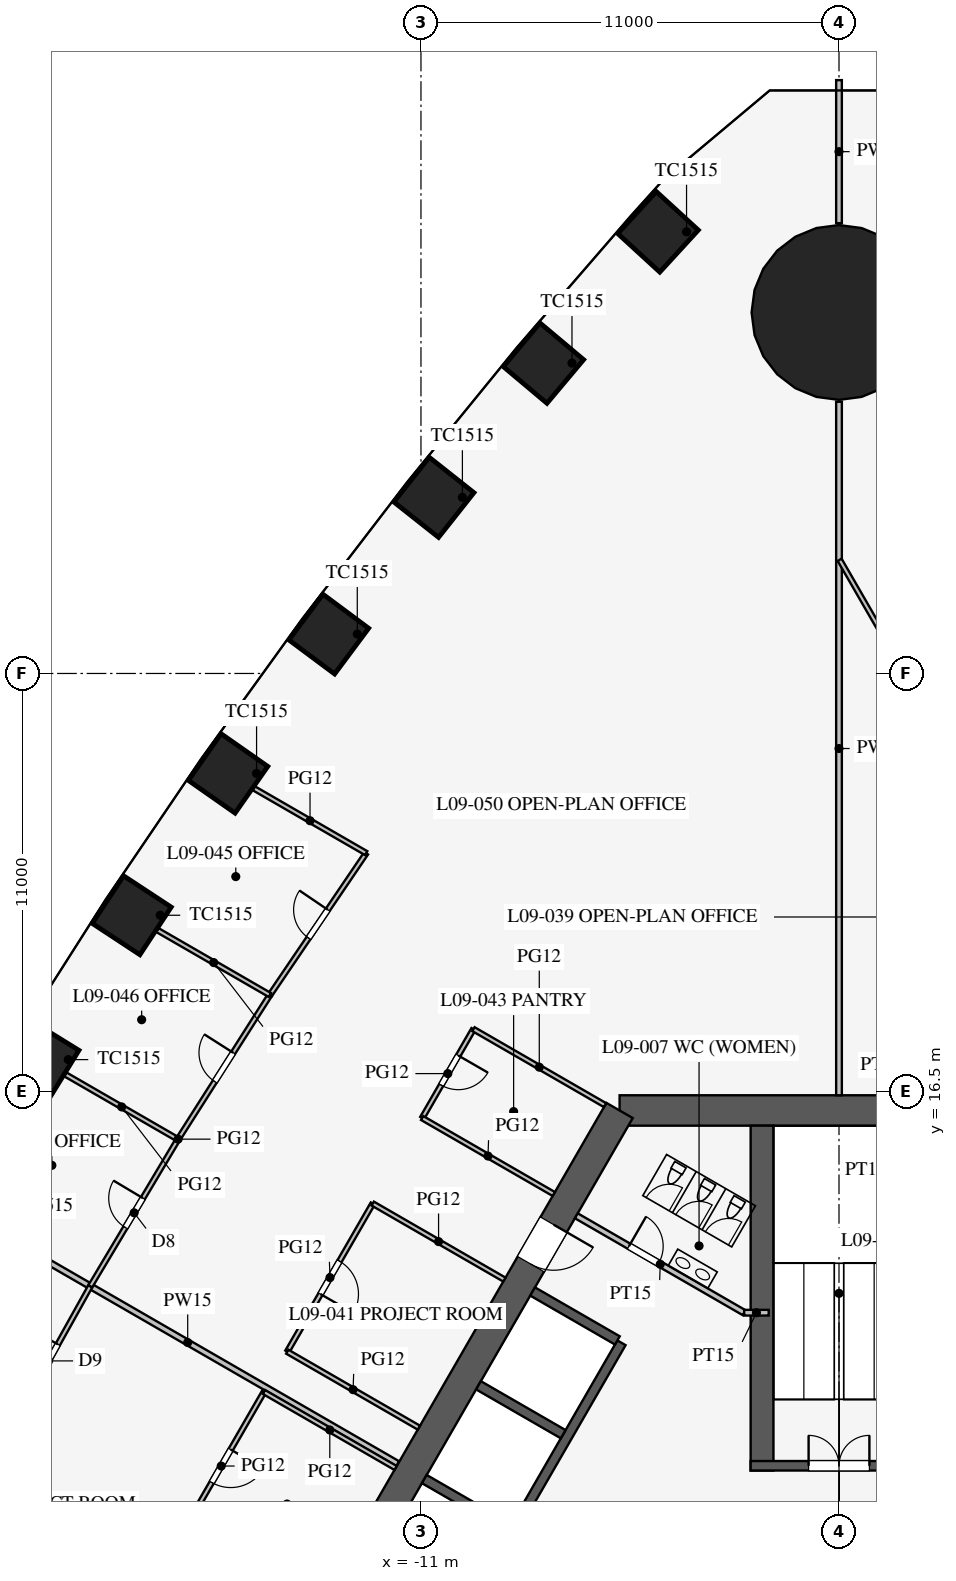
"""IFC4 building model, lengths in metres.
Left out: names, types, materials, properties, quantities, classifications, styles, units other than length and angle.
Written with IfcOpenShell. Run it as: python <this file> out.ifc"""

import sys

from ifc_helpers import new_model, si_unit, direction, frame, frame_2d, origin, origin_2d, place, context, subcontext, project, spatial, rectangle, circle, extrude, element, fill, save


model = new_model("IFC4")
c1 = context("Model", 3, precision=1e-05, world=origin(), true_north=direction((0.0, 1.0)))
c2 = subcontext(c1, "Body", "Model", "MODEL_VIEW")
j1 = project(units=[si_unit("LENGTHUNIT", "METRE"), si_unit("PLANEANGLEUNIT", "RADIAN")], contexts=[c1])
p1 = place(None, origin())
s1 = spatial("IfcSite", under=j1, at=p1, CompositionType="ELEMENT")
p2 = place(p1, origin())
s2 = spatial("IfcBuilding", under=s1, at=p2, CompositionType="ELEMENT")
p3 = place(p2, frame((0.0, 0.0, 41.7)))
s3 = spatial("IfcBuildingStorey", under=s2, at=p3, CompositionType="ELEMENT", Elevation=41.7)
for number, where, z_axis, x_axis in (
    (1, (-4.762, 39.122, 0.0), (0.0, 0.0, 1.0), (-0.676, -0.737, 0.0)),
    (2, (-7.776, 35.667, 0.0), (0.0, 0.0, 1.0), (-0.643, -0.766, 0.0)),
    (3, (-10.66, 32.135, 0.0), (0.0, 0.0, 1.0), (-0.62, -0.784, 0.0)),
    (4, (-13.426, 28.536, 0.0), (0.0, 0.0, 1.0), (-0.597, -0.802, 0.0)),
    (5, (-16.076, 24.87, 0.0), (0.0, 0.0, 1.0), (-0.574, -0.819, 0.0)),
    (6, (-18.611, 21.137, 0.0), (0.0, 0.0, 1.0), (-0.549, -0.836, 0.0)),
    (7, (-21.031, 17.339, 0.0), (0.0, 0.0, 1.0), (-0.525, -0.851, 0.0)),
):
    element("IfcColumn", number, at=place(p3, frame(where, z_axis=z_axis, x_axis=x_axis)), inside=s3, PredefinedType="COLUMN", context=c2, shape_type="SweptSolid", body=[
        extrude(rectangle(XDim=1.5, YDim=1.5, at=origin_2d()), origin(), (0.0, 0.0, 1.0), 4.2),
    ])
p4 = place(p3, frame((0.0, 37.0, 0.0), z_axis=(0.0, 0.0, 1.0), x_axis=(1.0, 0.0, 0.0)))
e8 = element("IfcColumn", 8, at=p4, inside=s3, PredefinedType="COLUMN", context=c2, shape_type="SweptSolid", body=[
    extrude(circle(Radius=2.3, at=origin_2d()), origin(), (0.0, 0.0, 1.0), 4.2),
])
p5 = place(p3, frame((5.773, 16.0, 0.0), z_axis=(0.0, 0.0, 1.0), x_axis=(-1.0, 0.0, 0.0)))
e9 = element("IfcWall", 9, at=p5, inside=s3, PredefinedType="SHEAR", context=c2, shape_type="SweptSolid", body=[
    extrude(rectangle(XDim=11.547, YDim=0.8, at=frame_2d((5.773, 0.0))), origin(), (0.0, 0.0, 1.0), 4.2),
])
p6 = place(p3, frame((-5.773, 16.0, 0.0), z_axis=(0.0, 0.0, 1.0), x_axis=(-0.500002442456, -0.866023993627, 0.0)))
e10 = element("IfcWall", 10, at=p6, inside=s3, PredefinedType="SHEAR", context=c2, shape_type="SweptSolid", body=[
    extrude(rectangle(XDim=21.939, YDim=0.8, at=frame_2d((10.97, 0.0))), origin(), (0.0, 0.0, 1.0), 4.2),
])
p7 = place(p6, frame((17.27, 0.0, 0.0)))
e11 = element("IfcOpeningElement", 11, at=p7, cuts=e10, PredefinedType="OPENING", context=c2, shape_type="SweptSolid", body=[
    extrude(rectangle(XDim=1.2, YDim=2.1, at=frame_2d((0.6, 1.05))), frame((0.0, 0.41, 0.0), z_axis=(0.0, -1.0, 0.0), x_axis=(1.0, 0.0, 0.0)), (0.0, 0.0, 1.0), 0.82),
])
p8 = place(p6, frame((3.47, 0.0, 0.0)))
e12 = element("IfcOpeningElement", 12, at=p8, cuts=e10, PredefinedType="OPENING", context=c2, shape_type="SweptSolid", body=[
    extrude(rectangle(XDim=1.2, YDim=2.1, at=frame_2d((0.6, 1.05))), frame((0.0, 0.41, 0.0), z_axis=(0.0, -1.0, 0.0), x_axis=(1.0, 0.0, 0.0)), (0.0, 0.0, 1.0), 0.82),
])
p9 = place(p3, frame((-5.724, 9.886, 0.0), z_axis=(0.0, 0.0, 1.0), x_axis=(-0.500001763848, -0.866024385424, 0.0)))
e13 = element("IfcWall", 13, at=p9, inside=s3, PredefinedType="SHEAR", context=c2, shape_type="SweptSolid", body=[
    extrude(rectangle(XDim=11.4, YDim=0.25, at=frame_2d((5.7, 0.0))), origin(), (0.0, 0.0, 1.0), 4.2),
])
p10 = place(p9, frame((6.525, 0.0, 0.0)))
e14 = element("IfcOpeningElement", 14, at=p10, cuts=e13, PredefinedType="OPENING", context=c2, shape_type="SweptSolid", body=[
    extrude(rectangle(XDim=1.2, YDim=2.2, at=frame_2d((0.6, 1.1))), frame((0.0, 0.135, 0.0), z_axis=(0.0, -1.0, 0.0), x_axis=(1.0, 0.0, 0.0)), (0.0, 0.0, 1.0), 0.27),
])
p11 = place(p9, frame((9.375, 0.0, 0.0)))
e15 = element("IfcOpeningElement", 15, at=p11, cuts=e13, PredefinedType="OPENING", context=c2, shape_type="SweptSolid", body=[
    extrude(rectangle(XDim=1.2, YDim=2.2, at=frame_2d((0.6, 1.1))), frame((0.0, 0.135, 0.0), z_axis=(0.0, -1.0, 0.0), x_axis=(1.0, 0.0, 0.0)), (0.0, 0.0, 1.0), 0.27),
])
p12 = place(p3, frame((-5.832, 9.949, 0.0), z_axis=(0.0, 0.0, 1.0), x_axis=(-0.866029291668, 0.499993265928, 0.0)))
e16 = element("IfcWall", 16, at=p12, inside=s3, PredefinedType="SHEAR", context=c2, shape_type="SweptSolid", body=[
    extrude(rectangle(XDim=2.575, YDim=0.25, at=frame_2d((1.288, 0.0))), origin(), (0.0, 0.0, 1.0), 4.2),
])
for number, where, z_axis, x_axis in (
    (17, (-7.257, 7.481, 0.0), (0.0, 0.0, 1.0), (-0.866, 0.5, 0.0)),
    (18, (-8.682, 5.012, 0.0), (0.0, 0.0, 1.0), (-0.866, 0.5, 0.0)),
):
    element("IfcWall", number, at=place(p3, frame(where, z_axis=z_axis, x_axis=x_axis)), inside=s3, PredefinedType="SHEAR", context=c2, shape_type="SweptSolid", body=[
        extrude(rectangle(XDim=2.575, YDim=0.25, at=frame_2d((1.288, 0.0))), origin(), (0.0, 0.0, 1.0), 4.2),
    ])
p13 = place(p3, frame((-2.025, 6.525, 0.0), z_axis=(0.0, 0.0, 1.0), x_axis=(0.0, 1.0, 0.0)))
e19 = element("IfcWall", 19, at=p13, inside=s3, PredefinedType="SHEAR", context=c2, shape_type="SweptSolid", body=[
    extrude(rectangle(XDim=9.075, YDim=0.6, at=frame_2d((4.538, 0.0))), origin(), (0.0, 0.0, 1.0), 4.2),
])
p14 = place(p3, frame((2.325, 6.65, 0.0), z_axis=(0.0, 0.0, 1.0), x_axis=(-1.0, 0.0, 0.0)))
e20 = element("IfcWall", 20, at=p14, inside=s3, PredefinedType="SHEAR", context=c2, shape_type="SweptSolid", body=[
    extrude(rectangle(XDim=4.65, YDim=0.25, at=frame_2d((2.325, 0.0))), origin(), (0.0, 0.0, 1.0), 4.2),
])
p15 = place(p14, frame((1.525, 0.0, 0.0)))
e21 = element("IfcOpeningElement", 21, at=p15, cuts=e20, PredefinedType="OPENING", context=c2, shape_type="SweptSolid", body=[
    extrude(rectangle(XDim=1.6, YDim=2.1, at=frame_2d((0.8, 1.05))), frame((0.0, 0.135, 0.0), z_axis=(0.0, -1.0, 0.0), x_axis=(1.0, 0.0, 0.0)), (0.0, 0.0, 1.0), 0.27),
])
p16 = place(p3, frame((-2.495, 10.678, 0.0), z_axis=(0.0, 0.0, 1.0), x_axis=(-0.86602216432, 0.500005610874, 0.0)))
e22 = element("IfcWall", 22, at=p16, inside=s3, PredefinedType="PARTITIONING", context=c2, shape_type="SweptSolid", body=[
    extrude(rectangle(XDim=5.1, YDim=0.15, at=frame_2d((2.55, 0.0))), origin(), (0.0, 0.0, 1.0), 4.0),
])
p17 = place(p16, frame((2.6, 0.0, 0.0)))
e23 = element("IfcOpeningElement", 23, at=p17, cuts=e22, PredefinedType="OPENING", context=c2, shape_type="SweptSolid", body=[
    extrude(rectangle(XDim=0.9, YDim=2.1, at=frame_2d((0.45, 1.05))), frame((0.0, 0.085, 0.0), z_axis=(0.0, -1.0, 0.0), x_axis=(1.0, 0.0, 0.0)), (0.0, 0.0, 1.0), 0.17),
])
p18 = place(p3, frame((-2.495, 10.678, 0.0), z_axis=(0.0, 0.0, 1.0), x_axis=(1.0, 0.0, 0.0)))
e24 = element("IfcWall", 24, at=p18, inside=s3, PredefinedType="PARTITIONING", context=c2, shape_type="SweptSolid", body=[
    extrude(rectangle(XDim=0.645, YDim=0.15, at=frame_2d((0.323, 0.0))), origin(), (0.0, 0.0, 1.0), 4.0),
])
p19 = place(p3, frame((0.0, 16.4, 0.0), z_axis=(0.0, 0.0, 1.0), x_axis=(0.0, 1.0, 0.0)))
e25 = element("IfcWall", 25, at=p19, inside=s3, PredefinedType="PARTITIONING", context=c2, shape_type="SweptSolid", body=[
    extrude(rectangle(XDim=18.25, YDim=0.15, at=frame_2d((9.125, 0.0))), origin(), (0.0, 0.0, 1.0), 2.3),
])
p20 = place(p3, frame((0.0, 39.35, 0.0), z_axis=(0.0, 0.0, 1.0), x_axis=(0.0, 1.0, 0.0)))
e26 = element("IfcWall", 26, at=p20, inside=s3, PredefinedType="PARTITIONING", context=c2, shape_type="SweptSolid", body=[
    extrude(rectangle(XDim=3.764, YDim=0.15, at=frame_2d((1.882, 0.0))), origin(), (0.0, 0.0, 1.0), 2.3),
])
p21 = place(p3, frame((26.415, -15.231, 0.0), z_axis=(0.0, 0.0, 1.0), x_axis=(-0.50000091641, 0.866024874695, 0.0)))
e27 = element("IfcWall", 27, at=p21, inside=s3, PredefinedType="PARTITIONING", context=c2, shape_type="SweptSolid", body=[
    extrude(rectangle(XDim=52.796, YDim=0.12, at=frame_2d((26.398, 0.0))), origin(), (0.0, 0.0, 1.0), 2.9),
])
p22 = place(p21, frame((10.2, 0.0, 0.15)))
e28 = element("IfcOpeningElement", 28, at=p22, cuts=e27, PredefinedType="OPENING", context=c2, shape_type="SweptSolid", body=[
    extrude(rectangle(XDim=1.8, YDim=2.1, at=frame_2d((0.9, 1.05))), frame((0.0, 0.07, 0.0), z_axis=(0.0, -1.0, 0.0), x_axis=(1.0, 0.0, 0.0)), (0.0, 0.0, 1.0), 0.14),
])
p23 = place(p21, frame((40.8, 0.0, 0.15)))
e29 = element("IfcOpeningElement", 29, at=p23, cuts=e27, PredefinedType="OPENING", context=c2, shape_type="SweptSolid", body=[
    extrude(rectangle(XDim=1.8, YDim=2.1, at=frame_2d((0.9, 1.05))), frame((0.0, 0.07, 0.0), z_axis=(0.0, -1.0, 0.0), x_axis=(1.0, 0.0, 0.0)), (0.0, 0.0, 1.0), 0.14),
])
p24 = place(p3, frame((-11.613, 6.705, 0.0), z_axis=(0.0, 0.0, 1.0), x_axis=(-0.86602785495, 0.499995754432, 0.0)))
e30 = element("IfcWall", 30, at=p24, inside=s3, PredefinedType="PARTITIONING", context=c2, shape_type="SweptSolid", body=[
    extrude(rectangle(XDim=12.759, YDim=0.15, at=frame_2d((6.379, 0.0))), origin(), (0.0, 0.0, 1.0), 3.2),
])
p25 = place(p3, frame((-15.131, 8.592, 0.0), z_axis=(0.0, 0.0, 1.0), x_axis=(-0.499990139034, -0.866031096941, 0.0)))
e31 = element("IfcWall", 31, at=p25, inside=s3, PredefinedType="PARTITIONING", context=c2, shape_type="SweptSolid", body=[
    extrude(rectangle(XDim=4.5, YDim=0.12, at=frame_2d((2.25, 0.0))), origin(), (0.0, 0.0, 1.0), 2.9),
])
p26 = place(p25, frame((1.75, 0.0, 0.15)))
e32 = element("IfcOpeningElement", 32, at=p26, cuts=e31, PredefinedType="OPENING", context=c2, shape_type="SweptSolid", body=[
    extrude(rectangle(XDim=1.0, YDim=2.1, at=frame_2d((0.5, 1.05))), frame((0.0, 0.07, 0.0), z_axis=(0.0, -1.0, 0.0), x_axis=(1.0, 0.0, 0.0)), (0.0, 0.0, 1.0), 0.14),
])
p27 = place(p3, frame((-9.619, 18.14, 0.0), z_axis=(0.0, 0.0, 1.0), x_axis=(-0.499980770555, -0.866036505625, 0.0)))
e33 = element("IfcWall", 33, at=p27, inside=s3, PredefinedType="PARTITIONING", context=c2, shape_type="SweptSolid", body=[
    extrude(rectangle(XDim=2.7, YDim=0.12, at=frame_2d((1.35, 0.0))), origin(), (0.0, 0.0, 1.0), 2.9),
])
p28 = place(p27, frame((0.8, 0.0, 0.15)))
e34 = element("IfcOpeningElement", 34, at=p28, cuts=e33, PredefinedType="OPENING", context=c2, shape_type="SweptSolid", body=[
    extrude(rectangle(XDim=0.9, YDim=2.1, at=frame_2d((0.45, 1.05))), frame((0.0, 0.07, 0.0), z_axis=(0.0, -1.0, 0.0), x_axis=(1.0, 0.0, 0.0)), (0.0, 0.0, 1.0), 0.14),
])
p29 = place(p3, frame((-12.269, 13.55, 0.0), z_axis=(0.0, 0.0, 1.0), x_axis=(-0.499990139034, -0.866031096941, 0.0)))
e35 = element("IfcWall", 35, at=p29, inside=s3, PredefinedType="PARTITIONING", context=c2, shape_type="SweptSolid", body=[
    extrude(rectangle(XDim=4.5, YDim=0.12, at=frame_2d((2.25, 0.0))), origin(), (0.0, 0.0, 1.0), 2.9),
])
p30 = place(p29, frame((1.75, 0.0, 0.15)))
e36 = element("IfcOpeningElement", 36, at=p30, cuts=e35, PredefinedType="OPENING", context=c2, shape_type="SweptSolid", body=[
    extrude(rectangle(XDim=1.0, YDim=2.1, at=frame_2d((0.5, 1.05))), frame((0.0, 0.07, 0.0), z_axis=(0.0, -1.0, 0.0), x_axis=(1.0, 0.0, 0.0)), (0.0, 0.0, 1.0), 0.14),
])
for number, where, z_axis, x_axis in (
    (37, (-11.667, 6.592, 0.0), (0.0, 0.0, 1.0), (-0.866, 0.5, 0.0)),
    (38, (-11.055, 7.653, 0.0), (0.0, 0.0, 1.0), (-0.866, 0.5, 0.0)),
    (39, (-6.155, 16.14, 0.0), (0.0, 0.0, 1.0), (-0.866, 0.5, 0.0)),
    (40, (-8.805, 11.55, 0.0), (0.0, 0.0, 1.0), (-0.866, 0.5, 0.0)),
    (41, (-7.505, 13.802, 0.0), (0.0, 0.0, 1.0), (-0.866, 0.5, 0.0)),
):
    element("IfcWall", number, at=place(p3, frame(where, z_axis=z_axis, x_axis=x_axis)), inside=s3, PredefinedType="PARTITIONING", context=c2, shape_type="SweptSolid", body=[
        extrude(rectangle(XDim=4.0, YDim=0.12, at=frame_2d((2.0, 0.0))), origin(), (0.0, 0.0, 1.0), 2.9),
    ])
p31 = place(p3, frame((-19.701, 11.374, 0.0), z_axis=(0.0, 0.0, 1.0), x_axis=(-0.487415216275, -0.87317031955, 0.0)))
e42 = element("IfcWall", 42, at=p31, inside=s3, PredefinedType="PARTITIONING", context=c2, shape_type="SweptSolid", body=[
    extrude(rectangle(XDim=4.5, YDim=0.12, at=frame_2d((2.25, 0.0))), origin(), (0.0, 0.0, 1.0), 2.9),
])
p32 = place(p31, frame((1.75, 0.0, 0.15)))
e43 = element("IfcOpeningElement", 43, at=p32, cuts=e42, PredefinedType="OPENING", context=c2, shape_type="SweptSolid", body=[
    extrude(rectangle(XDim=1.0, YDim=2.1, at=frame_2d((0.5, 1.05))), frame((0.0, 0.07, 0.0), z_axis=(0.0, -1.0, 0.0), x_axis=(1.0, 0.0, 0.0)), (0.0, 0.0, 1.0), 0.14),
])
p33 = place(p3, frame((-12.441, 22.771, 0.0), z_axis=(0.0, 0.0, 1.0), x_axis=(-0.561512004239, -0.827468591002, 0.0)))
e44 = element("IfcWall", 44, at=p33, inside=s3, PredefinedType="PARTITIONING", context=c2, shape_type="SweptSolid", body=[
    extrude(rectangle(XDim=4.512, YDim=0.12, at=frame_2d((2.256, 0.0))), origin(), (0.0, 0.0, 1.0), 2.9),
])
p34 = place(p33, frame((1.8, 0.0, 0.15)))
e45 = element("IfcOpeningElement", 45, at=p34, cuts=e44, PredefinedType="OPENING", context=c2, shape_type="SweptSolid", body=[
    extrude(rectangle(XDim=0.9, YDim=2.1, at=frame_2d((0.45, 1.05))), frame((0.0, 0.07, 0.0), z_axis=(0.0, -1.0, 0.0), x_axis=(1.0, 0.0, 0.0)), (0.0, 0.0, 1.0), 0.14),
])
p35 = place(p3, frame((-17.395, 15.239, 0.0), z_axis=(0.0, 0.0, 1.0), x_axis=(-0.512483962191, -0.858696796604, 0.0)))
e46 = element("IfcWall", 46, at=p35, inside=s3, PredefinedType="PARTITIONING", context=c2, shape_type="SweptSolid", body=[
    extrude(rectangle(XDim=4.5, YDim=0.12, at=frame_2d((2.25, 0.0))), origin(), (0.0, 0.0, 1.0), 2.9),
])
p36 = place(p35, frame((1.8, 0.0, 0.15)))
e47 = element("IfcOpeningElement", 47, at=p36, cuts=e46, PredefinedType="OPENING", context=c2, shape_type="SweptSolid", body=[
    extrude(rectangle(XDim=0.9, YDim=2.1, at=frame_2d((0.45, 1.05))), frame((0.0, 0.07, 0.0), z_axis=(0.0, -1.0, 0.0), x_axis=(1.0, 0.0, 0.0)), (0.0, 0.0, 1.0), 0.14),
])
p37 = place(p3, frame((-14.975, 19.038, 0.0), z_axis=(0.0, 0.0, 1.0), x_axis=(-0.537243691336, -0.843427066272, 0.0)))
e48 = element("IfcWall", 48, at=p37, inside=s3, PredefinedType="PARTITIONING", context=c2, shape_type="SweptSolid", body=[
    extrude(rectangle(XDim=4.504, YDim=0.12, at=frame_2d((2.252, 0.0))), origin(), (0.0, 0.0, 1.0), 2.9),
])
p38 = place(p37, frame((1.8, 0.0, 0.15)))
e49 = element("IfcOpeningElement", 49, at=p38, cuts=e48, PredefinedType="OPENING", context=c2, shape_type="SweptSolid", body=[
    extrude(rectangle(XDim=0.9, YDim=2.1, at=frame_2d((0.45, 1.05))), frame((0.0, 0.07, 0.0), z_axis=(0.0, -1.0, 0.0), x_axis=(1.0, 0.0, 0.0)), (0.0, 0.0, 1.0), 0.14),
])
p39 = place(p3, frame((-12.441, 22.771, 0.0), z_axis=(0.0, 0.0, 1.0), x_axis=(-0.866016478054, 0.500015459501, 0.0)))
e50 = element("IfcWall", 50, at=p39, inside=s3, PredefinedType="PARTITIONING", context=c2, shape_type="SweptSolid", body=[
    extrude(rectangle(XDim=3.414, YDim=0.12, at=frame_2d((1.707, 0.0))), origin(), (0.0, 0.0, 1.0), 2.9),
])
p40 = place(p3, frame((-17.395, 15.239, 0.0), z_axis=(0.0, 0.0, 1.0), x_axis=(-0.866015553834, 0.500017060227, 0.0)))
e51 = element("IfcWall", 51, at=p40, inside=s3, PredefinedType="PARTITIONING", context=c2, shape_type="SweptSolid", body=[
    extrude(rectangle(XDim=3.419, YDim=0.12, at=frame_2d((1.71, 0.0))), origin(), (0.0, 0.0, 1.0), 2.9),
])
p41 = place(p3, frame((-14.975, 19.038, 0.0), z_axis=(0.0, 0.0, 1.0), x_axis=(-0.866014265796, 0.500019291066, 0.0)))
e52 = element("IfcWall", 52, at=p41, inside=s3, PredefinedType="PARTITIONING", context=c2, shape_type="SweptSolid", body=[
    extrude(rectangle(XDim=3.417, YDim=0.12, at=frame_2d((1.708, 0.0))), origin(), (0.0, 0.0, 1.0), 2.9),
])
p42 = place(p17, frame((0.9, 0.0, 0.0), z_axis=(0.0, 0.0, 1.0), x_axis=(-1.0, 0.0, 0.0)))
e53 = element("IfcDoor", 53, at=p42, inside=s3, OperationType="SINGLE_SWING_LEFT", PredefinedType="DOOR", context=c2, shape_type="SweptSolid", body=[
    extrude(rectangle(XDim=0.9, YDim=2.1, at=frame_2d((0.45, 1.05))), frame((0.0, 0.025, 0.0), z_axis=(0.0, -1.0, 0.0), x_axis=(1.0, 0.0, 0.0)), (0.0, 0.0, 1.0), 0.05),
])
fill(e23, e53)
p43 = place(p15, frame((1.6, 0.0, 0.0), z_axis=(0.0, 0.0, 1.0), x_axis=(-1.0, 0.0, 0.0)))
e54 = element("IfcDoor", 54, at=p43, inside=s3, OperationType="DOUBLE_DOOR_SINGLE_SWING", PredefinedType="DOOR", context=c2, shape_type="SweptSolid", body=[
    extrude(rectangle(XDim=1.6, YDim=2.1, at=frame_2d((0.8, 1.05))), frame((0.0, 0.025, 0.0), z_axis=(0.0, -1.0, 0.0), x_axis=(1.0, 0.0, 0.0)), (0.0, 0.0, 1.0), 0.05),
])
fill(e21, e54)
p44 = place(p8, origin())
e55 = element("IfcDoor", 55, at=p44, inside=s3, OperationType="SINGLE_SWING_LEFT", PredefinedType="DOOR", context=c2, shape_type="SweptSolid", body=[
    extrude(rectangle(XDim=1.2, YDim=2.1, at=frame_2d((0.6, 1.05))), frame((0.0, 0.025, 0.0), z_axis=(0.0, -1.0, 0.0), x_axis=(1.0, 0.0, 0.0)), (0.0, 0.0, 1.0), 0.05),
])
fill(e12, e55)
p45 = place(p30, origin())
e56 = element("IfcDoor", 56, at=p45, inside=s3, OperationType="SINGLE_SWING_RIGHT", PredefinedType="DOOR", context=c2, shape_type="SweptSolid", body=[
    extrude(rectangle(XDim=1.0, YDim=2.1, at=frame_2d((0.5, 1.05))), frame((0.0, 0.025, 0.0), z_axis=(0.0, -1.0, 0.0), x_axis=(1.0, 0.0, 0.0)), (0.0, 0.0, 1.0), 0.05),
])
fill(e36, e56)
p46 = place(p26, origin())
e57 = element("IfcDoor", 57, at=p46, inside=s3, OperationType="SINGLE_SWING_LEFT", PredefinedType="DOOR", context=c2, shape_type="SweptSolid", body=[
    extrude(rectangle(XDim=1.0, YDim=2.1, at=frame_2d((0.5, 1.05))), frame((0.0, 0.025, 0.0), z_axis=(0.0, -1.0, 0.0), x_axis=(1.0, 0.0, 0.0)), (0.0, 0.0, 1.0), 0.05),
])
fill(e32, e57)
p47 = place(p28, origin())
e58 = element("IfcDoor", 58, at=p47, inside=s3, OperationType="SINGLE_SWING_LEFT", PredefinedType="DOOR", context=c2, shape_type="SweptSolid", body=[
    extrude(rectangle(XDim=0.9, YDim=2.1, at=frame_2d((0.45, 1.05))), frame((0.0, 0.025, 0.0), z_axis=(0.0, -1.0, 0.0), x_axis=(1.0, 0.0, 0.0)), (0.0, 0.0, 1.0), 0.05),
])
fill(e34, e58)
p48 = place(p34, frame((0.9, 0.0, 0.0), z_axis=(0.0, 0.0, 1.0), x_axis=(-1.0, 0.0, 0.0)))
e59 = element("IfcDoor", 59, at=p48, inside=s3, OperationType="SINGLE_SWING_RIGHT", PredefinedType="DOOR", context=c2, shape_type="SweptSolid", body=[
    extrude(rectangle(XDim=0.9, YDim=2.1, at=frame_2d((0.45, 1.05))), frame((0.0, 0.025, 0.0), z_axis=(0.0, -1.0, 0.0), x_axis=(1.0, 0.0, 0.0)), (0.0, 0.0, 1.0), 0.05),
])
fill(e45, e59)
p49 = place(p38, frame((0.9, 0.0, 0.0), z_axis=(0.0, 0.0, 1.0), x_axis=(-1.0, 0.0, 0.0)))
e60 = element("IfcDoor", 60, at=p49, inside=s3, OperationType="SINGLE_SWING_RIGHT", PredefinedType="DOOR", context=c2, shape_type="SweptSolid", body=[
    extrude(rectangle(XDim=0.9, YDim=2.1, at=frame_2d((0.45, 1.05))), frame((0.0, 0.025, 0.0), z_axis=(0.0, -1.0, 0.0), x_axis=(1.0, 0.0, 0.0)), (0.0, 0.0, 1.0), 0.05),
])
fill(e49, e60)
p50 = place(p36, frame((0.9, 0.0, 0.0), z_axis=(0.0, 0.0, 1.0), x_axis=(-1.0, 0.0, 0.0)))
e61 = element("IfcDoor", 61, at=p50, inside=s3, OperationType="SINGLE_SWING_RIGHT", PredefinedType="DOOR", context=c2, shape_type="SweptSolid", body=[
    extrude(rectangle(XDim=0.9, YDim=2.1, at=frame_2d((0.45, 1.05))), frame((0.0, 0.025, 0.0), z_axis=(0.0, -1.0, 0.0), x_axis=(1.0, 0.0, 0.0)), (0.0, 0.0, 1.0), 0.05),
])
fill(e47, e61)
p51 = place(p32, frame((1.0, 0.0, 0.0), z_axis=(0.0, 0.0, 1.0), x_axis=(-1.0, 0.0, 0.0)))
e62 = element("IfcDoor", 62, at=p51, inside=s3, OperationType="SINGLE_SWING_RIGHT", PredefinedType="DOOR", context=c2, shape_type="SweptSolid", body=[
    extrude(rectangle(XDim=1.0, YDim=2.1, at=frame_2d((0.5, 1.05))), frame((0.0, 0.025, 0.0), z_axis=(0.0, -1.0, 0.0), x_axis=(1.0, 0.0, 0.0)), (0.0, 0.0, 1.0), 0.05),
])
fill(e43, e62)
save(model, sys.argv[1])
